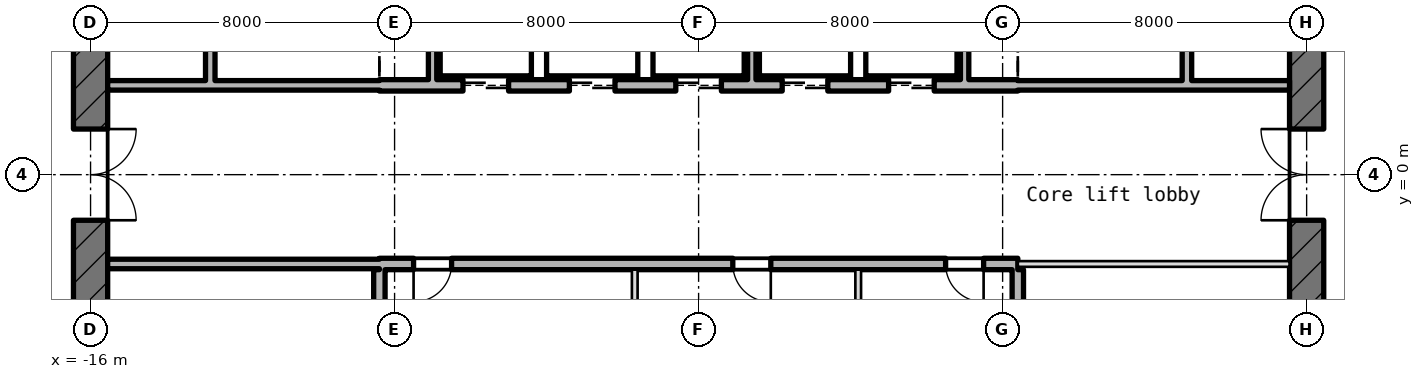
"""IFC4 building model, lengths in metres.
Left out: names, types, materials, properties, quantities, classifications, styles, units other than length and angle.
Written with IfcOpenShell. Run it as: python <this file> out.ifc"""

import sys

from ifc_helpers import new_model, si_unit, direction, frame, frame_2d, origin, place, context, subcontext, project, spatial, rectangle, extrude, element, fill, save


model = new_model("IFC4")
c1 = context("Model", 3, precision=1e-05, world=origin(), true_north=direction((0.0, 1.0)))
c2 = subcontext(c1, "Body", "Model", "MODEL_VIEW")
j1 = project(units=[si_unit("LENGTHUNIT", "METRE"), si_unit("PLANEANGLEUNIT", "RADIAN")], contexts=[c1])
p1 = place(None, origin())
s1 = spatial("IfcSite", under=j1, at=p1, CompositionType="ELEMENT")
p2 = place(p1, origin())
s2 = spatial("IfcBuilding", under=s1, at=p2, CompositionType="ELEMENT")
p3 = place(p2, frame((0.0, 0.0, 185.95)))
s3 = spatial("IfcBuildingStorey", under=s2, at=p3, CompositionType="ELEMENT", Elevation=185.95)
p4 = place(p3, frame((16.0, -10.186, -0.18), z_axis=(0.0, 0.0, 1.0), x_axis=(0.0, 1.0, 0.0)))
e1 = element("IfcWall", 1, at=p4, inside=s3, PredefinedType="SHEAR", context=c2, shape_type="SweptSolid", body=[
    extrude(rectangle(XDim=20.373, YDim=0.9, at=frame_2d((10.186, 0.0))), origin(), (0.0, 0.0, 1.0), 4.15),
])
p5 = place(p4, frame((8.986, 0.0, 0.18)))
e2 = element("IfcOpeningElement", 2, at=p5, cuts=e1, PredefinedType="OPENING", context=c2, shape_type="SweptSolid", body=[
    extrude(rectangle(XDim=2.4, YDim=2.1, at=frame_2d((1.2, 1.05))), frame((0.0, 0.46, 0.0), z_axis=(0.0, -1.0, 0.0), x_axis=(1.0, 0.0, 0.0)), (0.0, 0.0, 1.0), 0.92),
])
p6 = place(p4, frame((13.586, 0.0, 0.18)))
e3 = element("IfcOpeningElement", 3, at=p6, cuts=e1, PredefinedType="OPENING", context=c2, shape_type="SweptSolid", body=[
    extrude(rectangle(XDim=1.2, YDim=2.1, at=frame_2d((0.6, 1.05))), frame((0.0, 0.46, 0.0), z_axis=(0.0, -1.0, 0.0), x_axis=(1.0, 0.0, 0.0)), (0.0, 0.0, 1.0), 0.92),
])
p7 = place(p4, frame((2.4, 0.0, 0.18)))
e4 = element("IfcOpeningElement", 4, at=p7, cuts=e1, PredefinedType="OPENING", context=c2, shape_type="SweptSolid", body=[
    extrude(rectangle(XDim=1.2, YDim=2.1, at=frame_2d((0.6, 1.05))), frame((0.0, 0.46, 0.0), z_axis=(0.0, -1.0, 0.0), x_axis=(1.0, 0.0, 0.0)), (0.0, 0.0, 1.0), 0.92),
])
p8 = place(p3, frame((-16.0, 10.186, -0.18), z_axis=(0.0, 0.0, 1.0), x_axis=(0.0, -1.0, 0.0)))
e5 = element("IfcWall", 5, at=p8, inside=s3, PredefinedType="SHEAR", context=c2, shape_type="SweptSolid", body=[
    extrude(rectangle(XDim=20.373, YDim=0.9, at=frame_2d((10.186, 0.0))), origin(), (0.0, 0.0, 1.0), 4.15),
])
p9 = place(p8, frame((8.986, 0.0, 0.18)))
e6 = element("IfcOpeningElement", 6, at=p9, cuts=e5, PredefinedType="OPENING", context=c2, shape_type="SweptSolid", body=[
    extrude(rectangle(XDim=2.4, YDim=2.1, at=frame_2d((1.2, 1.05))), frame((0.0, 0.46, 0.0), z_axis=(0.0, -1.0, 0.0), x_axis=(1.0, 0.0, 0.0)), (0.0, 0.0, 1.0), 0.92),
])
p10 = place(p8, frame((5.586, 0.0, 0.18)))
e7 = element("IfcOpeningElement", 7, at=p10, cuts=e5, PredefinedType="OPENING", context=c2, shape_type="SweptSolid", body=[
    extrude(rectangle(XDim=1.2, YDim=2.1, at=frame_2d((0.6, 1.05))), frame((0.0, 0.46, 0.0), z_axis=(0.0, -1.0, 0.0), x_axis=(1.0, 0.0, 0.0)), (0.0, 0.0, 1.0), 0.92),
])
p11 = place(p3, frame((-15.55, -2.35, 0.0), z_axis=(0.0, 0.0, 1.0), x_axis=(1.0, 0.0, 0.0)))
e8 = element("IfcWall", 8, at=p11, inside=s3, PredefinedType="STANDARD", context=c2, shape_type="SweptSolid", body=[
    extrude(rectangle(XDim=7.15, YDim=0.25, at=frame_2d((3.575, 0.0))), origin(), (0.0, 0.0, 1.0), 3.97),
])
p12 = place(p3, frame((-8.4, -2.35, -0.18), z_axis=(0.0, 0.0, 1.0), x_axis=(1.0, 0.0, 0.0)))
e9 = element("IfcWall", 9, at=p12, inside=s3, PredefinedType="SHEAR", context=c2, shape_type="SweptSolid", body=[
    extrude(rectangle(XDim=16.8, YDim=0.3, at=frame_2d((8.4, 0.0))), origin(), (0.0, 0.0, 1.0), 4.15),
])
p13 = place(p12, frame((0.9, 0.0, 0.18)))
e10 = element("IfcOpeningElement", 10, at=p13, cuts=e9, PredefinedType="OPENING", context=c2, shape_type="SweptSolid", body=[
    extrude(rectangle(XDim=1.0, YDim=2.1, at=frame_2d((0.5, 1.05))), frame((0.0, 0.16, 0.0), z_axis=(0.0, -1.0, 0.0), x_axis=(1.0, 0.0, 0.0)), (0.0, 0.0, 1.0), 0.32),
])
p14 = place(p12, frame((9.3, 0.0, 0.18)))
e11 = element("IfcOpeningElement", 11, at=p14, cuts=e9, PredefinedType="OPENING", context=c2, shape_type="SweptSolid", body=[
    extrude(rectangle(XDim=1.0, YDim=2.1, at=frame_2d((0.5, 1.05))), frame((0.0, 0.16, 0.0), z_axis=(0.0, -1.0, 0.0), x_axis=(1.0, 0.0, 0.0)), (0.0, 0.0, 1.0), 0.32),
])
p15 = place(p12, frame((14.9, 0.0, 0.18)))
e12 = element("IfcOpeningElement", 12, at=p15, cuts=e9, PredefinedType="OPENING", context=c2, shape_type="SweptSolid", body=[
    extrude(rectangle(XDim=1.0, YDim=2.1, at=frame_2d((0.5, 1.05))), frame((0.0, 0.16, 0.0), z_axis=(0.0, -1.0, 0.0), x_axis=(1.0, 0.0, 0.0)), (0.0, 0.0, 1.0), 0.32),
])
p16 = place(p3, frame((8.4, -2.35, 0.0), z_axis=(0.0, 0.0, 1.0), x_axis=(1.0, 0.0, 0.0)))
e13 = element("IfcWall", 13, at=p16, inside=s3, PredefinedType="PARTITIONING", context=c2, shape_type="SweptSolid", body=[
    extrude(rectangle(XDim=7.15, YDim=0.15, at=frame_2d((3.575, 0.0))), origin(), (0.0, 0.0, 1.0), 3.97),
])
p17 = place(p3, frame((-15.55, 2.35, 0.0), z_axis=(0.0, 0.0, 1.0), x_axis=(1.0, 0.0, 0.0)))
e14 = element("IfcWall", 14, at=p17, inside=s3, PredefinedType="STANDARD", context=c2, shape_type="SweptSolid", body=[
    extrude(rectangle(XDim=7.15, YDim=0.25, at=frame_2d((3.575, 0.0))), origin(), (0.0, 0.0, 1.0), 3.97),
])
p18 = place(p3, frame((-8.4, 2.35, -0.18), z_axis=(0.0, 0.0, 1.0), x_axis=(1.0, 0.0, 0.0)))
e15 = element("IfcWall", 15, at=p18, inside=s3, PredefinedType="SHEAR", context=c2, shape_type="SweptSolid", body=[
    extrude(rectangle(XDim=16.8, YDim=0.3, at=frame_2d((8.4, 0.0))), origin(), (0.0, 0.0, 1.0), 4.15),
])
p19 = place(p18, frame((2.2, 0.0, 0.18)))
e16 = element("IfcOpeningElement", 16, at=p19, cuts=e15, PredefinedType="OPENING", context=c2, shape_type="SweptSolid", body=[
    extrude(rectangle(XDim=1.2, YDim=2.1, at=frame_2d((0.6, 1.05))), frame((0.0, 0.16, 0.0), z_axis=(0.0, -1.0, 0.0), x_axis=(1.0, 0.0, 0.0)), (0.0, 0.0, 1.0), 0.32),
])
p20 = place(p18, frame((5.0, 0.0, 0.18)))
e17 = element("IfcOpeningElement", 17, at=p20, cuts=e15, PredefinedType="OPENING", context=c2, shape_type="SweptSolid", body=[
    extrude(rectangle(XDim=1.2, YDim=2.1, at=frame_2d((0.6, 1.05))), frame((0.0, 0.16, 0.0), z_axis=(0.0, -1.0, 0.0), x_axis=(1.0, 0.0, 0.0)), (0.0, 0.0, 1.0), 0.32),
])
p21 = place(p18, frame((7.8, 0.0, 0.18)))
e18 = element("IfcOpeningElement", 18, at=p21, cuts=e15, PredefinedType="OPENING", context=c2, shape_type="SweptSolid", body=[
    extrude(rectangle(XDim=1.2, YDim=2.1, at=frame_2d((0.6, 1.05))), frame((0.0, 0.16, 0.0), z_axis=(0.0, -1.0, 0.0), x_axis=(1.0, 0.0, 0.0)), (0.0, 0.0, 1.0), 0.32),
])
p22 = place(p18, frame((10.6, 0.0, 0.18)))
e19 = element("IfcOpeningElement", 19, at=p22, cuts=e15, PredefinedType="OPENING", context=c2, shape_type="SweptSolid", body=[
    extrude(rectangle(XDim=1.2, YDim=2.1, at=frame_2d((0.6, 1.05))), frame((0.0, 0.16, 0.0), z_axis=(0.0, -1.0, 0.0), x_axis=(1.0, 0.0, 0.0)), (0.0, 0.0, 1.0), 0.32),
])
p23 = place(p18, frame((13.4, 0.0, 0.18)))
e20 = element("IfcOpeningElement", 20, at=p23, cuts=e15, PredefinedType="OPENING", context=c2, shape_type="SweptSolid", body=[
    extrude(rectangle(XDim=1.2, YDim=2.1, at=frame_2d((0.6, 1.05))), frame((0.0, 0.16, 0.0), z_axis=(0.0, -1.0, 0.0), x_axis=(1.0, 0.0, 0.0)), (0.0, 0.0, 1.0), 0.32),
])
p24 = place(p3, frame((8.4, 2.35, 0.0), z_axis=(0.0, 0.0, 1.0), x_axis=(1.0, 0.0, 0.0)))
e21 = element("IfcWall", 21, at=p24, inside=s3, PredefinedType="STANDARD", context=c2, shape_type="SweptSolid", body=[
    extrude(rectangle(XDim=7.15, YDim=0.25, at=frame_2d((3.575, 0.0))), origin(), (0.0, 0.0, 1.0), 3.97),
])
p25 = place(p3, frame((-12.85, 2.475, 0.0), z_axis=(0.0, 0.0, 1.0), x_axis=(0.0, 1.0, 0.0)))
e22 = element("IfcWall", 22, at=p25, inside=s3, PredefinedType="STANDARD", context=c2, shape_type="SweptSolid", body=[
    extrude(rectangle(XDim=3.05, YDim=0.25, at=frame_2d((1.525, 0.0))), origin(), (0.0, 0.0, 1.0), 3.97),
])
p26 = place(p3, frame((-8.4, -8.75, -0.18), z_axis=(0.0, 0.0, 1.0), x_axis=(0.0, 1.0, 0.0)))
e23 = element("IfcWall", 23, at=p26, inside=s3, PredefinedType="SHEAR", context=c2, shape_type="SweptSolid", body=[
    extrude(rectangle(XDim=6.25, YDim=0.3, at=frame_2d((3.125, 0.0))), origin(), (0.0, 0.0, 1.0), 4.15),
])
p27 = place(p3, frame((-7.0, 2.5, 0.0), z_axis=(0.0, 0.0, 1.0), x_axis=(0.0, 1.0, 0.0)))
e24 = element("IfcWall", 24, at=p27, inside=s3, PredefinedType="STANDARD", context=c2, shape_type="SweptSolid", body=[
    extrude(rectangle(XDim=2.74, YDim=0.22, at=frame_2d((1.37, 0.0))), origin(), (0.0, 0.0, 1.0), 3.97),
])
p28 = place(p3, frame((-1.68, -5.24, 0.0), z_axis=(0.0, 0.0, 1.0), x_axis=(0.0, 1.0, 0.0)))
e25 = element("IfcWall", 25, at=p28, inside=s3, PredefinedType="PARTITIONING", context=c2, shape_type="SweptSolid", body=[
    extrude(rectangle(XDim=2.74, YDim=0.15, at=frame_2d((1.37, 0.0))), origin(), (0.0, 0.0, 1.0), 3.97),
])
p29 = place(p3, frame((1.4, 2.5, 0.0), z_axis=(0.0, 0.0, 1.0), x_axis=(0.0, 1.0, 0.0)))
e26 = element("IfcWall", 26, at=p29, inside=s3, PredefinedType="STANDARD", context=c2, shape_type="SweptSolid", body=[
    extrude(rectangle(XDim=2.74, YDim=0.22, at=frame_2d((1.37, 0.0))), origin(), (0.0, 0.0, 1.0), 3.97),
])
p30 = place(p3, frame((4.2, -5.24, 0.0), z_axis=(0.0, 0.0, 1.0), x_axis=(0.0, 1.0, 0.0)))
e27 = element("IfcWall", 27, at=p30, inside=s3, PredefinedType="PARTITIONING", context=c2, shape_type="SweptSolid", body=[
    extrude(rectangle(XDim=2.74, YDim=0.15, at=frame_2d((1.37, 0.0))), origin(), (0.0, 0.0, 1.0), 3.97),
])
p31 = place(p3, frame((7.0, 2.5, 0.0), z_axis=(0.0, 0.0, 1.0), x_axis=(0.0, 1.0, 0.0)))
e28 = element("IfcWall", 28, at=p31, inside=s3, PredefinedType="STANDARD", context=c2, shape_type="SweptSolid", body=[
    extrude(rectangle(XDim=2.74, YDim=0.22, at=frame_2d((1.37, 0.0))), origin(), (0.0, 0.0, 1.0), 3.97),
])
p32 = place(p3, frame((8.4, -8.35, -0.18), z_axis=(0.0, 0.0, 1.0), x_axis=(0.0, 1.0, 0.0)))
e29 = element("IfcWall", 29, at=p32, inside=s3, PredefinedType="SHEAR", context=c2, shape_type="SweptSolid", body=[
    extrude(rectangle(XDim=5.85, YDim=0.3, at=frame_2d((2.925, 0.0))), origin(), (0.0, 0.0, 1.0), 4.15),
])
p33 = place(p3, frame((12.85, 2.475, 0.0), z_axis=(0.0, 0.0, 1.0), x_axis=(0.0, 1.0, 0.0)))
e30 = element("IfcWall", 30, at=p33, inside=s3, PredefinedType="STANDARD", context=c2, shape_type="SweptSolid", body=[
    extrude(rectangle(XDim=3.05, YDim=0.25, at=frame_2d((1.525, 0.0))), origin(), (0.0, 0.0, 1.0), 3.97),
])
p34 = place(p19, origin())
e31 = element("IfcDoor", 31, at=p34, inside=s3, OperationType="DOUBLE_DOOR_SLIDING", PredefinedType="DOOR", context=c2, shape_type="SweptSolid", body=[
    extrude(rectangle(XDim=1.2, YDim=2.1, at=frame_2d((0.6, 1.05))), frame((0.0, 0.025, 0.0), z_axis=(0.0, -1.0, 0.0), x_axis=(1.0, 0.0, 0.0)), (0.0, 0.0, 1.0), 0.05),
])
fill(e16, e31)
p35 = place(p20, origin())
e32 = element("IfcDoor", 32, at=p35, inside=s3, OperationType="DOUBLE_DOOR_SLIDING", PredefinedType="DOOR", context=c2, shape_type="SweptSolid", body=[
    extrude(rectangle(XDim=1.2, YDim=2.1, at=frame_2d((0.6, 1.05))), frame((0.0, 0.025, 0.0), z_axis=(0.0, -1.0, 0.0), x_axis=(1.0, 0.0, 0.0)), (0.0, 0.0, 1.0), 0.05),
])
fill(e17, e32)
p36 = place(p21, origin())
e33 = element("IfcDoor", 33, at=p36, inside=s3, OperationType="DOUBLE_DOOR_SLIDING", PredefinedType="DOOR", context=c2, shape_type="SweptSolid", body=[
    extrude(rectangle(XDim=1.2, YDim=2.1, at=frame_2d((0.6, 1.05))), frame((0.0, 0.025, 0.0), z_axis=(0.0, -1.0, 0.0), x_axis=(1.0, 0.0, 0.0)), (0.0, 0.0, 1.0), 0.05),
])
fill(e18, e33)
p37 = place(p22, origin())
e34 = element("IfcDoor", 34, at=p37, inside=s3, OperationType="DOUBLE_DOOR_SLIDING", PredefinedType="DOOR", context=c2, shape_type="SweptSolid", body=[
    extrude(rectangle(XDim=1.2, YDim=2.1, at=frame_2d((0.6, 1.05))), frame((0.0, 0.025, 0.0), z_axis=(0.0, -1.0, 0.0), x_axis=(1.0, 0.0, 0.0)), (0.0, 0.0, 1.0), 0.05),
])
fill(e19, e34)
p38 = place(p23, origin())
e35 = element("IfcDoor", 35, at=p38, inside=s3, OperationType="DOUBLE_DOOR_SLIDING", PredefinedType="DOOR", context=c2, shape_type="SweptSolid", body=[
    extrude(rectangle(XDim=1.2, YDim=2.1, at=frame_2d((0.6, 1.05))), frame((0.0, 0.025, 0.0), z_axis=(0.0, -1.0, 0.0), x_axis=(1.0, 0.0, 0.0)), (0.0, 0.0, 1.0), 0.05),
])
fill(e20, e35)
p39 = place(p9, origin())
e36 = element("IfcDoor", 36, at=p39, inside=s3, OperationType="DOUBLE_DOOR_SINGLE_SWING", PredefinedType="DOOR", context=c2, shape_type="SweptSolid", body=[
    extrude(rectangle(XDim=2.4, YDim=2.1, at=frame_2d((1.2, 1.05))), frame((0.0, 0.025, 0.0), z_axis=(0.0, -1.0, 0.0), x_axis=(1.0, 0.0, 0.0)), (0.0, 0.0, 1.0), 0.05),
])
fill(e6, e36)
p40 = place(p5, origin())
e37 = element("IfcDoor", 37, at=p40, inside=s3, OperationType="DOUBLE_DOOR_SINGLE_SWING", PredefinedType="DOOR", context=c2, shape_type="SweptSolid", body=[
    extrude(rectangle(XDim=2.4, YDim=2.1, at=frame_2d((1.2, 1.05))), frame((0.0, 0.025, 0.0), z_axis=(0.0, -1.0, 0.0), x_axis=(1.0, 0.0, 0.0)), (0.0, 0.0, 1.0), 0.05),
])
fill(e2, e37)
p41 = place(p13, frame((1.0, 0.0, 0.0), z_axis=(0.0, 0.0, 1.0), x_axis=(-1.0, 0.0, 0.0)))
e38 = element("IfcDoor", 38, at=p41, inside=s3, OperationType="SINGLE_SWING_LEFT", PredefinedType="DOOR", context=c2, shape_type="SweptSolid", body=[
    extrude(rectangle(XDim=1.0, YDim=2.1, at=frame_2d((0.5, 1.05))), frame((0.0, 0.025, 0.0), z_axis=(0.0, -1.0, 0.0), x_axis=(1.0, 0.0, 0.0)), (0.0, 0.0, 1.0), 0.05),
])
fill(e10, e38)
p42 = place(p14, frame((1.0, 0.0, 0.0), z_axis=(0.0, 0.0, 1.0), x_axis=(-1.0, 0.0, 0.0)))
e39 = element("IfcDoor", 39, at=p42, inside=s3, OperationType="SINGLE_SWING_LEFT", PredefinedType="DOOR", context=c2, shape_type="SweptSolid", body=[
    extrude(rectangle(XDim=1.0, YDim=2.1, at=frame_2d((0.5, 1.05))), frame((0.0, 0.025, 0.0), z_axis=(0.0, -1.0, 0.0), x_axis=(1.0, 0.0, 0.0)), (0.0, 0.0, 1.0), 0.05),
])
fill(e11, e39)
p43 = place(p15, frame((1.0, 0.0, 0.0), z_axis=(0.0, 0.0, 1.0), x_axis=(-1.0, 0.0, 0.0)))
e40 = element("IfcDoor", 40, at=p43, inside=s3, OperationType="SINGLE_SWING_LEFT", PredefinedType="DOOR", context=c2, shape_type="SweptSolid", body=[
    extrude(rectangle(XDim=1.0, YDim=2.1, at=frame_2d((0.5, 1.05))), frame((0.0, 0.025, 0.0), z_axis=(0.0, -1.0, 0.0), x_axis=(1.0, 0.0, 0.0)), (0.0, 0.0, 1.0), 0.05),
])
fill(e12, e40)
save(model, sys.argv[1])
